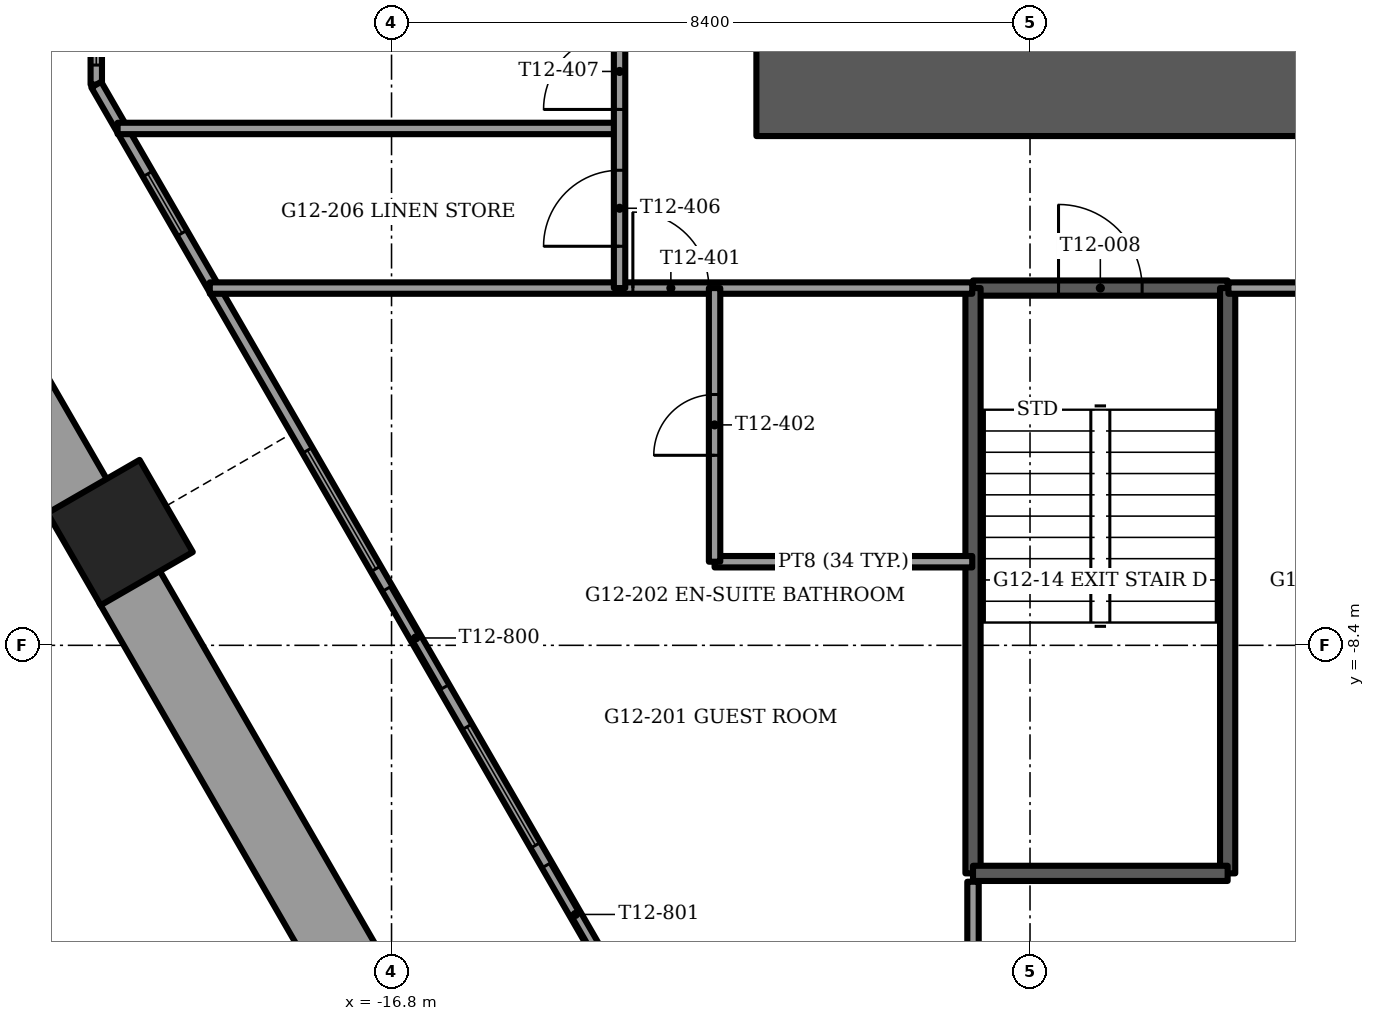
"""IFC4 building model, lengths in metres.
Left out: names, types, materials, properties, quantities, classifications, styles, units other than length and angle.
Written with IfcOpenShell. Run it as: python <this file> out.ifc"""

import sys

from ifc_helpers import new_model, si_unit, direction, frame, frame_2d, origin, origin_2d, place, context, subcontext, project, spatial, rectangle, extrude, element, fill, save


model = new_model("IFC4")
c1 = context("Model", 3, precision=1e-05, world=origin(), true_north=direction((0.0, 1.0)))
c2 = subcontext(c1, "Body", "Model", "MODEL_VIEW")
j1 = project(units=[si_unit("LENGTHUNIT", "METRE"), si_unit("PLANEANGLEUNIT", "RADIAN")], contexts=[c1])
p1 = place(None, origin())
s1 = spatial("IfcSite", under=j1, at=p1, CompositionType="ELEMENT")
p2 = place(p1, origin())
s2 = spatial("IfcBuilding", under=s1, at=p2, CompositionType="ELEMENT")
p3 = place(p2, frame((0.0, 0.0, 50.5)))
s3 = spatial("IfcBuildingStorey", under=s2, at=p3, CompositionType="ELEMENT", Elevation=50.5)
p4 = place(p3, frame((-20.371, -6.917, -1.2), z_axis=(0.0, 0.0, 1.0), x_axis=(-0.5, 0.866025403784, 0.0)))
e1 = element("IfcColumn", 1, at=p4, inside=s3, PredefinedType="COLUMN", context=c2, shape_type="SweptSolid", body=[
    extrude(rectangle(XDim=1.4, YDim=1.4, at=origin_2d()), origin(), (0.0, 0.0, 1.0), 3.75),
])
p5 = place(p3, frame((-12.0, -1.1, -0.3), z_axis=(0.0, 0.0, 1.0), x_axis=(1.0, 0.0, 0.0)))
e2 = element("IfcWall", 2, at=p5, inside=s3, PredefinedType="SHEAR", context=c2, shape_type="SweptSolid", body=[
    extrude(rectangle(XDim=24.0, YDim=1.2, at=frame_2d((12.0, 0.0))), origin(), (0.0, 0.0, 1.0), 3.75),
])
p6 = place(p5, frame((11.2, 0.0, 0.0)))
e3 = element("IfcOpeningElement", 3, at=p6, cuts=e2, PredefinedType="OPENING", context=c2, shape_type="SweptSolid", body=[
    extrude(rectangle(XDim=1.6, YDim=2.1, at=frame_2d((0.8, 1.05))), frame((0.0, 0.6, 0.0), z_axis=(0.0, -1.0, 0.0), x_axis=(1.0, 0.0, 0.0)), (0.0, 0.0, 1.0), 1.2),
])
p7 = place(p3, frame((-23.991, -1.147, 0.0), z_axis=(0.0, 0.0, 1.0), x_axis=(0.500007141444, -0.86602128063, 0.0)))
e4 = element("IfcWall", 4, at=p7, inside=s3, PredefinedType="PARAPET", context=c2, shape_type="SweptSolid", body=[
    extrude(rectangle(XDim=6.137, YDim=0.9, at=frame_2d((3.068, 0.0))), origin(), (0.0, 0.0, 1.0), 1.1),
])
p8 = place(p3, frame((-20.252, -7.622, 0.0), z_axis=(0.0, 0.0, 1.0), x_axis=(0.499997206141, -0.866027016814, 0.0)))
e5 = element("IfcWall", 5, at=p8, inside=s3, PredefinedType="PARAPET", context=c2, shape_type="SweptSolid", body=[
    extrude(rectangle(XDim=7.051, YDim=0.9, at=frame_2d((3.525, 0.0))), origin(), (0.0, 0.0, 1.0), 1.1),
])
p9 = place(p3, frame((-20.685, -1.023, 0.0), z_axis=(0.0, 0.0, 1.0), x_axis=(0.500004426522, -0.866022848116, 0.0)))
e6 = element("IfcWall", 6, at=p9, inside=s3, PredefinedType="SOLIDWALL", context=c2, shape_type="SweptSolid", body=[
    extrude(rectangle(XDim=18.912, YDim=0.15, at=frame_2d((9.456, 0.0))), origin(), (0.0, 0.0, 1.0), 3.45),
])
p10 = place(p9, frame((1.356, 0.0, 0.15)))
e7 = element("IfcOpeningElement", 7, at=p10, cuts=e6, PredefinedType="OPENING", context=c2, shape_type="SweptSolid", body=[
    extrude(rectangle(XDim=0.9, YDim=2.85, at=frame_2d((0.45, 1.425))), frame((0.0, 0.075, 0.0), z_axis=(0.0, -1.0, 0.0), x_axis=(1.0, 0.0, 0.0)), (0.0, 0.0, 1.0), 0.15),
])
p11 = place(p9, frame((5.556, 0.0, 0.15)))
e8 = element("IfcOpeningElement", 8, at=p11, cuts=e6, PredefinedType="OPENING", context=c2, shape_type="SweptSolid", body=[
    extrude(rectangle(XDim=1.8, YDim=2.85, at=frame_2d((0.9, 1.425))), frame((0.0, 0.075, 0.0), z_axis=(0.0, -1.0, 0.0), x_axis=(1.0, 0.0, 0.0)), (0.0, 0.0, 1.0), 0.15),
])
p12 = place(p9, frame((7.656, 0.0, 0.0)))
e9 = element("IfcOpeningElement", 9, at=p12, cuts=e6, PredefinedType="OPENING", context=c2, shape_type="SweptSolid", body=[
    extrude(rectangle(XDim=1.5, YDim=2.4, at=frame_2d((0.75, 1.2))), frame((0.0, 0.075, 0.0), z_axis=(0.0, -1.0, 0.0), x_axis=(1.0, 0.0, 0.0)), (0.0, 0.0, 1.0), 0.15),
])
p13 = place(p9, frame((9.756, 0.0, 0.15)))
e10 = element("IfcOpeningElement", 10, at=p13, cuts=e6, PredefinedType="OPENING", context=c2, shape_type="SweptSolid", body=[
    extrude(rectangle(XDim=1.8, YDim=2.85, at=frame_2d((0.9, 1.425))), frame((0.0, 0.075, 0.0), z_axis=(0.0, -1.0, 0.0), x_axis=(1.0, 0.0, 0.0)), (0.0, 0.0, 1.0), 0.15),
])
p14 = place(p9, frame((11.856, 0.0, 0.0)))
e11 = element("IfcOpeningElement", 11, at=p14, cuts=e6, PredefinedType="OPENING", context=c2, shape_type="SweptSolid", body=[
    extrude(rectangle(XDim=1.5, YDim=2.4, at=frame_2d((0.75, 1.2))), frame((0.0, 0.075, 0.0), z_axis=(0.0, -1.0, 0.0), x_axis=(1.0, 0.0, 0.0)), (0.0, 0.0, 1.0), 0.15),
])
p15 = place(p9, frame((13.956, 0.0, 0.15)))
e12 = element("IfcOpeningElement", 12, at=p15, cuts=e6, PredefinedType="OPENING", context=c2, shape_type="SweptSolid", body=[
    extrude(rectangle(XDim=1.8, YDim=2.85, at=frame_2d((0.9, 1.425))), frame((0.0, 0.075, 0.0), z_axis=(0.0, -1.0, 0.0), x_axis=(1.0, 0.0, 0.0)), (0.0, 0.0, 1.0), 0.15),
])
p16 = place(p9, frame((16.056, 0.0, 0.0)))
e13 = element("IfcOpeningElement", 13, at=p16, cuts=e6, PredefinedType="OPENING", context=c2, shape_type="SweptSolid", body=[
    extrude(rectangle(XDim=1.5, YDim=2.4, at=frame_2d((0.75, 1.2))), frame((0.0, 0.075, 0.0), z_axis=(0.0, -1.0, 0.0), x_axis=(1.0, 0.0, 0.0)), (0.0, 0.0, 1.0), 0.15),
])
p17 = place(p3, frame((-20.685, 0.042, 0.0), z_axis=(0.0, 0.0, 1.0), x_axis=(0.0, -1.0, 0.0)))
e14 = element("IfcWall", 14, at=p17, inside=s3, PredefinedType="SOLIDWALL", context=c2, shape_type="SweptSolid", body=[
    extrude(rectangle(XDim=1.065, YDim=0.15, at=frame_2d((0.532, 0.0))), origin(), (0.0, 0.0, 1.0), 3.45),
])
p18 = place(p17, frame((0.258, 0.0, 0.15)))
e15 = element("IfcOpeningElement", 15, at=p18, cuts=e14, PredefinedType="OPENING", context=c2, shape_type="SweptSolid", body=[
    extrude(rectangle(XDim=0.55, YDim=2.85, at=frame_2d((0.275, 1.425))), frame((0.0, 0.075, 0.0), z_axis=(0.0, -1.0, 0.0), x_axis=(1.0, 0.0, 0.0)), (0.0, 0.0, 1.0), 0.15),
])
p19 = place(p3, frame((-9.15, -3.7, -0.3), z_axis=(0.0, 0.0, 1.0), x_axis=(1.0, 0.0, 0.0)))
e16 = element("IfcWall", 16, at=p19, inside=s3, PredefinedType="SOLIDWALL", context=c2, shape_type="SweptSolid", body=[
    extrude(rectangle(XDim=3.35, YDim=0.2, at=frame_2d((1.675, 0.0))), origin(), (0.0, 0.0, 1.0), 3.75),
])
p20 = place(p19, frame((1.125, 0.0, 0.0)))
e17 = element("IfcOpeningElement", 17, at=p20, cuts=e16, PredefinedType="OPENING", context=c2, shape_type="SweptSolid", body=[
    extrude(rectangle(XDim=1.1, YDim=2.1, at=frame_2d((0.55, 1.05))), frame((0.0, 0.1, 0.0), z_axis=(0.0, -1.0, 0.0), x_axis=(1.0, 0.0, 0.0)), (0.0, 0.0, 1.0), 0.2),
])
for number, where, z_axis, x_axis in (
    (18, (-9.15, -3.7, -0.3), (0.0, 0.0, 1.0), (0.0, -1.0, 0.0)),
    (19, (-5.8, -3.7, -0.3), (0.0, 0.0, 1.0), (0.0, -1.0, 0.0)),
):
    element("IfcWall", number, at=place(p3, frame(where, z_axis=z_axis, x_axis=x_axis)), inside=s3, PredefinedType="SOLIDWALL", context=c2, shape_type="SweptSolid", body=[
        extrude(rectangle(XDim=7.7, YDim=0.2, at=frame_2d((3.85, 0.0))), origin(), (0.0, 0.0, 1.0), 3.75),
    ])
p21 = place(p3, frame((-9.15, -11.4, -0.3), z_axis=(0.0, 0.0, 1.0), x_axis=(1.0, 0.0, 0.0)))
e20 = element("IfcWall", 20, at=p21, inside=s3, PredefinedType="SOLIDWALL", context=c2, shape_type="SweptSolid", body=[
    extrude(rectangle(XDim=3.35, YDim=0.2, at=frame_2d((1.675, 0.0))), origin(), (0.0, 0.0, 1.0), 3.75),
])
p22 = place(p3, frame((-12.55, -7.3, 0.0), z_axis=(0.0, 0.0, 1.0), x_axis=(1.0, 0.0, 0.0)))
e21 = element("IfcWall", 21, at=p22, inside=s3, PredefinedType="PARTITIONING", context=c2, shape_type="SweptSolid", body=[
    extrude(rectangle(XDim=3.39, YDim=0.15, at=frame_2d((1.695, 0.0))), origin(), (0.0, 0.0, 1.0), 3.45),
])
p23 = place(p3, frame((-19.191, -3.7, 0.0), z_axis=(0.0, 0.0, 1.0), x_axis=(1.0, 0.0, 0.0)))
e22 = element("IfcWall", 22, at=p23, inside=s3, PredefinedType="PARTITIONING", context=c2, shape_type="SweptSolid", body=[
    extrude(rectangle(XDim=10.031, YDim=0.15, at=frame_2d((5.016, 0.0))), origin(), (0.0, 0.0, 1.0), 3.45),
])
p24 = place(p23, frame((5.566, 0.0, 0.0)))
e23 = element("IfcOpeningElement", 23, at=p24, cuts=e22, PredefinedType="OPENING", context=c2, shape_type="SweptSolid", body=[
    extrude(rectangle(XDim=1.0, YDim=2.1, at=frame_2d((0.5, 1.05))), frame((0.0, 0.075, 0.0), z_axis=(0.0, -1.0, 0.0), x_axis=(1.0, 0.0, 0.0)), (0.0, 0.0, 1.0), 0.15),
])
p25 = place(p3, frame((-5.79, -3.7, 0.0), z_axis=(0.0, 0.0, 1.0), x_axis=(1.0, 0.0, 0.0)))
e24 = element("IfcWall", 24, at=p25, inside=s3, PredefinedType="PARTITIONING", context=c2, shape_type="SweptSolid", body=[
    extrude(rectangle(XDim=11.58, YDim=0.15, at=frame_2d((5.79, 0.0))), origin(), (0.0, 0.0, 1.0), 3.45),
])
p26 = place(p25, frame((2.39, 0.0, 0.0)))
e25 = element("IfcOpeningElement", 25, at=p26, cuts=e24, PredefinedType="OPENING", context=c2, shape_type="SweptSolid", body=[
    extrude(rectangle(XDim=1.0, YDim=2.1, at=frame_2d((0.5, 1.05))), frame((0.0, 0.075, 0.0), z_axis=(0.0, -1.0, 0.0), x_axis=(1.0, 0.0, 0.0)), (0.0, 0.0, 1.0), 0.15),
])
p27 = place(p25, frame((6.04, 0.0, 0.0)))
e26 = element("IfcOpeningElement", 26, at=p27, cuts=e24, PredefinedType="OPENING", context=c2, shape_type="SweptSolid", body=[
    extrude(rectangle(XDim=1.0, YDim=2.1, at=frame_2d((0.5, 1.05))), frame((0.0, 0.075, 0.0), z_axis=(0.0, -1.0, 0.0), x_axis=(1.0, 0.0, 0.0)), (0.0, 0.0, 1.0), 0.15),
])
p28 = place(p3, frame((-20.404, -1.6, 0.0), z_axis=(0.0, 0.0, 1.0), x_axis=(1.0, 0.0, 0.0)))
e27 = element("IfcWall", 27, at=p28, inside=s3, PredefinedType="PARTITIONING", context=c2, shape_type="SweptSolid", body=[
    extrude(rectangle(XDim=6.604, YDim=0.15, at=frame_2d((3.302, 0.0))), origin(), (0.0, 0.0, 1.0), 3.45),
])
p29 = place(p3, frame((-9.15, -17.979, 0.0), z_axis=(0.0, 0.0, 1.0), x_axis=(0.0, 1.0, 0.0)))
e28 = element("IfcWall", 28, at=p29, inside=s3, PredefinedType="PARTITIONING", context=c2, shape_type="SweptSolid", body=[
    extrude(rectangle(XDim=6.469, YDim=0.15, at=frame_2d((3.234, 0.0))), origin(), (0.0, 0.0, 1.0), 3.45),
])
p30 = place(p3, frame((-12.55, -7.3, 0.0), z_axis=(0.0, 0.0, 1.0), x_axis=(0.0, 1.0, 0.0)))
e29 = element("IfcWall", 29, at=p30, inside=s3, PredefinedType="PARTITIONING", context=c2, shape_type="SweptSolid", body=[
    extrude(rectangle(XDim=3.6, YDim=0.15, at=frame_2d((1.8, 0.0))), origin(), (0.0, 0.0, 1.0), 3.45),
])
p31 = place(p30, frame((1.4, 0.0, 0.0)))
e30 = element("IfcOpeningElement", 30, at=p31, cuts=e29, PredefinedType="OPENING", context=c2, shape_type="SweptSolid", body=[
    extrude(rectangle(XDim=0.8, YDim=2.1, at=frame_2d((0.4, 1.05))), frame((0.0, 0.075, 0.0), z_axis=(0.0, -1.0, 0.0), x_axis=(1.0, 0.0, 0.0)), (0.0, 0.0, 1.0), 0.15),
])
p32 = place(p3, frame((-13.8, -3.7, 0.0), z_axis=(0.0, 0.0, 1.0), x_axis=(0.0, 1.0, 0.0)))
e31 = element("IfcWall", 31, at=p32, inside=s3, PredefinedType="PARTITIONING", context=c2, shape_type="SweptSolid", body=[
    extrude(rectangle(XDim=15.756, YDim=0.15, at=frame_2d((7.878, 0.0))), origin(), (0.0, 0.0, 1.0), 3.45),
])
p33 = place(p32, frame((0.55, 0.0, 0.0)))
e32 = element("IfcOpeningElement", 32, at=p33, cuts=e31, PredefinedType="OPENING", context=c2, shape_type="SweptSolid", body=[
    extrude(rectangle(XDim=1.0, YDim=2.1, at=frame_2d((0.5, 1.05))), frame((0.0, 0.075, 0.0), z_axis=(0.0, -1.0, 0.0), x_axis=(1.0, 0.0, 0.0)), (0.0, 0.0, 1.0), 0.15),
])
p34 = place(p32, frame((2.35, 0.0, 0.0)))
e33 = element("IfcOpeningElement", 33, at=p34, cuts=e31, PredefinedType="OPENING", context=c2, shape_type="SweptSolid", body=[
    extrude(rectangle(XDim=1.0, YDim=2.1, at=frame_2d((0.5, 1.05))), frame((0.0, 0.075, 0.0), z_axis=(0.0, -1.0, 0.0), x_axis=(1.0, 0.0, 0.0)), (0.0, 0.0, 1.0), 0.15),
])
p35 = place(p32, frame((10.407, 0.0, 0.0)))
e34 = element("IfcOpeningElement", 34, at=p35, cuts=e31, PredefinedType="OPENING", context=c2, shape_type="SweptSolid", body=[
    extrude(rectangle(XDim=1.0, YDim=2.1, at=frame_2d((0.5, 1.05))), frame((0.0, 0.075, 0.0), z_axis=(0.0, -1.0, 0.0), x_axis=(1.0, 0.0, 0.0)), (0.0, 0.0, 1.0), 0.15),
])
p36 = place(p10, origin())
e35 = element("IfcWindow", 35, at=p36, inside=s3, PartitioningType="SINGLE_PANEL", PredefinedType="WINDOW", context=c2, shape_type="SweptSolid", body=[
    extrude(rectangle(XDim=0.9, YDim=2.85, at=frame_2d((0.45, 1.425))), frame((0.0, 0.03, 0.0), z_axis=(0.0, -1.0, 0.0), x_axis=(1.0, 0.0, 0.0)), (0.0, 0.0, 1.0), 0.06),
])
fill(e7, e35)
p37 = place(p11, origin())
e36 = element("IfcWindow", 36, at=p37, inside=s3, PartitioningType="SINGLE_PANEL", PredefinedType="WINDOW", context=c2, shape_type="SweptSolid", body=[
    extrude(rectangle(XDim=1.8, YDim=2.85, at=frame_2d((0.9, 1.425))), frame((0.0, 0.03, 0.0), z_axis=(0.0, -1.0, 0.0), x_axis=(1.0, 0.0, 0.0)), (0.0, 0.0, 1.0), 0.06),
])
fill(e8, e36)
p38 = place(p12, origin())
e37 = element("IfcDoor", 37, at=p38, inside=s3, OperationType="SLIDING_TO_RIGHT", PredefinedType="DOOR", context=c2, shape_type="SweptSolid", body=[
    extrude(rectangle(XDim=1.5, YDim=2.4, at=frame_2d((0.75, 1.2))), frame((0.0, 0.025, 0.0), z_axis=(0.0, -1.0, 0.0), x_axis=(1.0, 0.0, 0.0)), (0.0, 0.0, 1.0), 0.05),
])
fill(e9, e37)
p39 = place(p13, origin())
e38 = element("IfcWindow", 38, at=p39, inside=s3, PartitioningType="SINGLE_PANEL", PredefinedType="WINDOW", context=c2, shape_type="SweptSolid", body=[
    extrude(rectangle(XDim=1.8, YDim=2.85, at=frame_2d((0.9, 1.425))), frame((0.0, 0.03, 0.0), z_axis=(0.0, -1.0, 0.0), x_axis=(1.0, 0.0, 0.0)), (0.0, 0.0, 1.0), 0.06),
])
fill(e10, e38)
p40 = place(p14, origin())
e39 = element("IfcDoor", 39, at=p40, inside=s3, OperationType="SLIDING_TO_LEFT", PredefinedType="DOOR", context=c2, shape_type="SweptSolid", body=[
    extrude(rectangle(XDim=1.5, YDim=2.4, at=frame_2d((0.75, 1.2))), frame((0.0, 0.025, 0.0), z_axis=(0.0, -1.0, 0.0), x_axis=(1.0, 0.0, 0.0)), (0.0, 0.0, 1.0), 0.05),
])
fill(e11, e39)
p41 = place(p18, origin())
e40 = element("IfcWindow", 40, at=p41, inside=s3, PartitioningType="SINGLE_PANEL", PredefinedType="WINDOW", context=c2, shape_type="SweptSolid", body=[
    extrude(rectangle(XDim=0.55, YDim=2.85, at=frame_2d((0.275, 1.425))), frame((0.0, 0.03, 0.0), z_axis=(0.0, -1.0, 0.0), x_axis=(1.0, 0.0, 0.0)), (0.0, 0.0, 1.0), 0.06),
])
fill(e15, e40)
p42 = place(p20, origin())
e41 = element("IfcDoor", 41, at=p42, inside=s3, OperationType="SINGLE_SWING_LEFT", PredefinedType="DOOR", context=c2, shape_type="SweptSolid", body=[
    extrude(rectangle(XDim=1.1, YDim=2.1, at=frame_2d((0.55, 1.05))), frame((0.0, 0.025, 0.0), z_axis=(0.0, -1.0, 0.0), x_axis=(1.0, 0.0, 0.0)), (0.0, 0.0, 1.0), 0.05),
])
fill(e17, e41)
p43 = place(p24, origin())
e42 = element("IfcDoor", 42, at=p43, inside=s3, OperationType="SINGLE_SWING_LEFT", PredefinedType="DOOR", context=c2, shape_type="SweptSolid", body=[
    extrude(rectangle(XDim=1.0, YDim=2.1, at=frame_2d((0.5, 1.05))), frame((0.0, 0.025, 0.0), z_axis=(0.0, -1.0, 0.0), x_axis=(1.0, 0.0, 0.0)), (0.0, 0.0, 1.0), 0.05),
])
fill(e23, e42)
p44 = place(p31, origin())
e43 = element("IfcDoor", 43, at=p44, inside=s3, OperationType="SINGLE_SWING_RIGHT", PredefinedType="DOOR", context=c2, shape_type="SweptSolid", body=[
    extrude(rectangle(XDim=0.8, YDim=2.1, at=frame_2d((0.4, 1.05))), frame((0.0, 0.025, 0.0), z_axis=(0.0, -1.0, 0.0), x_axis=(1.0, 0.0, 0.0)), (0.0, 0.0, 1.0), 0.05),
])
fill(e30, e43)
p45 = place(p33, origin())
e44 = element("IfcDoor", 44, at=p45, inside=s3, OperationType="SINGLE_SWING_LEFT", PredefinedType="DOOR", context=c2, shape_type="SweptSolid", body=[
    extrude(rectangle(XDim=1.0, YDim=2.1, at=frame_2d((0.5, 1.05))), frame((0.0, 0.025, 0.0), z_axis=(0.0, -1.0, 0.0), x_axis=(1.0, 0.0, 0.0)), (0.0, 0.0, 1.0), 0.05),
])
fill(e32, e44)
p46 = place(p34, origin())
e45 = element("IfcDoor", 45, at=p46, inside=s3, OperationType="SINGLE_SWING_LEFT", PredefinedType="DOOR", context=c2, shape_type="SweptSolid", body=[
    extrude(rectangle(XDim=1.0, YDim=2.1, at=frame_2d((0.5, 1.05))), frame((0.0, 0.025, 0.0), z_axis=(0.0, -1.0, 0.0), x_axis=(1.0, 0.0, 0.0)), (0.0, 0.0, 1.0), 0.05),
])
fill(e33, e45)
save(model, sys.argv[1])
